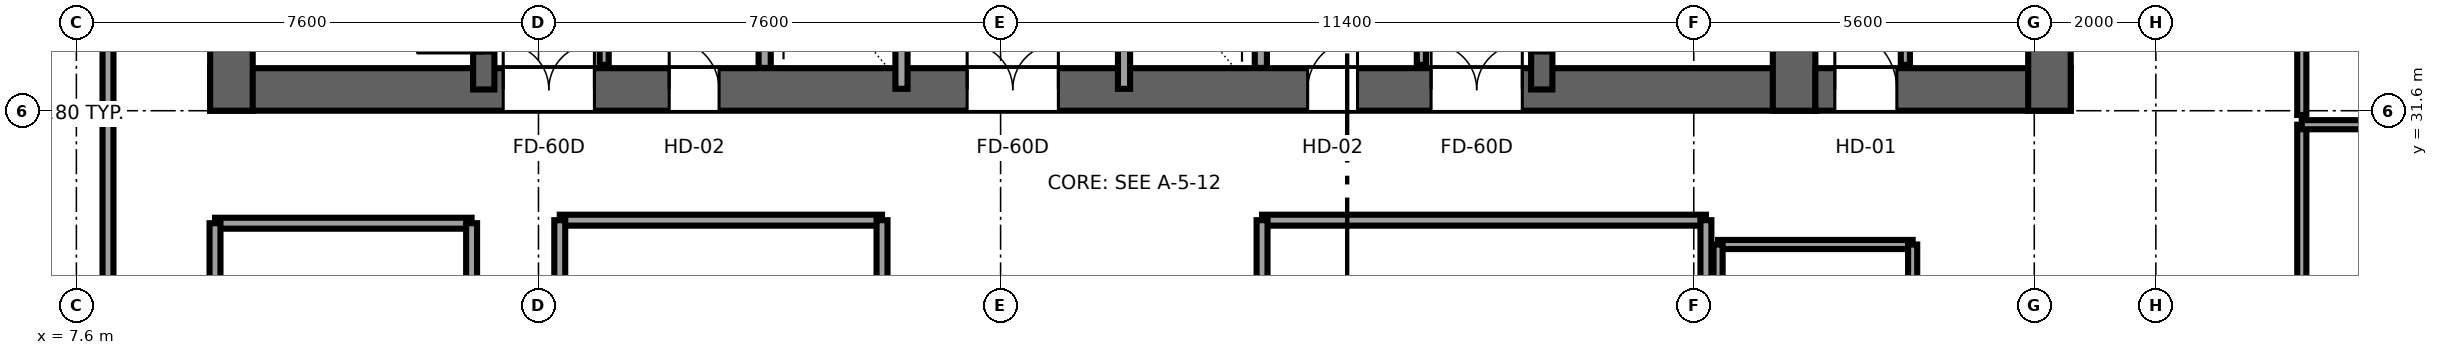
"""IFC4 building model, lengths in metres.
Left out: names, types, materials, properties, quantities, classifications, styles, units other than length and angle.
Written with IfcOpenShell. Run it as: python <this file> out.ifc"""

import sys

from ifc_helpers import new_model, si_unit, direction, frame, frame_2d, origin, place, context, subcontext, project, spatial, rectangle, extrude, source, transform, mapped, element, fill, save


model = new_model("IFC4")
c1 = context("Model", 3, precision=1e-05, world=origin(), true_north=direction((0.0, 1.0)))
c2 = subcontext(c1, "Body", "Model", "MODEL_VIEW")
j1 = project(units=[si_unit("LENGTHUNIT", "METRE"), si_unit("PLANEANGLEUNIT", "RADIAN")], contexts=[c1])
p1 = place(None, origin())
s1 = spatial("IfcSite", under=j1, at=p1, CompositionType="ELEMENT")
p2 = place(p1, origin())
s2 = spatial("IfcBuilding", under=s1, at=p2, CompositionType="ELEMENT")
p3 = place(p2, frame((0.0, 0.0, 136.4)))
s3 = spatial("IfcBuildingStorey", under=s2, at=p3, CompositionType="ELEMENT", Elevation=136.4)
p4 = place(p3, frame((9.8, 31.95, 0.0), z_axis=(0.0, 0.0, 1.0), x_axis=(1.0, 0.0, 0.0)))
e1 = element("IfcWall", 1, at=p4, inside=s3, PredefinedType="SHEAR", context=c2, shape_type="SweptSolid", body=[
    extrude(rectangle(XDim=26.4, YDim=0.7, at=frame_2d((13.2, 0.0))), origin(), (0.0, 0.0, 1.0), 3.55),
])
p5 = place(p4, frame((6.32, 0.0, 0.0), z_axis=(0.0, 0.0, 1.0), x_axis=(-1.0, 0.0, 0.0)))
e2 = element("IfcOpeningElement", 2, at=p5, cuts=e1, PredefinedType="OPENING", context=c2, shape_type="SweptSolid", body=[
    extrude(rectangle(XDim=1.5, YDim=2.04, at=frame_2d((0.75, 1.02))), frame((0.0, 0.36, 0.0), z_axis=(0.0, -1.0, 0.0), x_axis=(1.0, 0.0, 0.0)), (0.0, 0.0, 1.0), 0.72),
])
p6 = place(p4, frame((13.95, 0.0, 0.0), z_axis=(0.0, 0.0, 1.0), x_axis=(-1.0, 0.0, 0.0)))
e3 = element("IfcOpeningElement", 3, at=p6, cuts=e1, PredefinedType="OPENING", context=c2, shape_type="SweptSolid", body=[
    extrude(rectangle(XDim=1.5, YDim=2.04, at=frame_2d((0.75, 1.02))), frame((0.0, 0.36, 0.0), z_axis=(0.0, -1.0, 0.0), x_axis=(1.0, 0.0, 0.0)), (0.0, 0.0, 1.0), 0.72),
])
p7 = place(p4, frame((21.58, 0.0, 0.0), z_axis=(0.0, 0.0, 1.0), x_axis=(-1.0, 0.0, 0.0)))
e4 = element("IfcOpeningElement", 4, at=p7, cuts=e1, PredefinedType="OPENING", context=c2, shape_type="SweptSolid", body=[
    extrude(rectangle(XDim=1.5, YDim=2.04, at=frame_2d((0.75, 1.02))), frame((0.0, 0.36, 0.0), z_axis=(0.0, -1.0, 0.0), x_axis=(1.0, 0.0, 0.0)), (0.0, 0.0, 1.0), 0.72),
])
p8 = place(p4, frame((8.37, 0.0, 0.0), z_axis=(0.0, 0.0, 1.0), x_axis=(-1.0, 0.0, 0.0)))
e5 = element("IfcOpeningElement", 5, at=p8, cuts=e1, PredefinedType="OPENING", context=c2, shape_type="SweptSolid", body=[
    extrude(rectangle(XDim=0.82, YDim=2.01, at=frame_2d((0.41, 1.005))), frame((0.0, 0.36, 0.0), z_axis=(0.0, -1.0, 0.0), x_axis=(1.0, 0.0, 0.0)), (0.0, 0.0, 1.0), 0.72),
])
p9 = place(p4, frame((18.87, 0.0, 0.0), z_axis=(0.0, 0.0, 1.0), x_axis=(-1.0, 0.0, 0.0)))
e6 = element("IfcOpeningElement", 6, at=p9, cuts=e1, PredefinedType="OPENING", context=c2, shape_type="SweptSolid", body=[
    extrude(rectangle(XDim=0.82, YDim=2.01, at=frame_2d((0.41, 1.005))), frame((0.0, 0.36, 0.0), z_axis=(0.0, -1.0, 0.0), x_axis=(1.0, 0.0, 0.0)), (0.0, 0.0, 1.0), 0.72),
])
for number, where, z_axis, x_axis in (
    (7, (10.15, 31.6, 0.0), (0.0, 0.0, 1.0), (0.0, 1.0, 0.0)),
    (8, (35.85, 31.6, 0.0), (0.0, 0.0, 1.0), (0.0, 1.0, 0.0)),
):
    element("IfcWall", number, at=place(p3, frame(where, z_axis=z_axis, x_axis=x_axis)), inside=s3, PredefinedType="SHEAR", context=c2, shape_type="SweptSolid", body=[
        extrude(rectangle(XDim=13.6, YDim=0.7, at=frame_2d((6.8, 0.0))), origin(), (0.0, 0.0, 1.0), 3.55),
    ])
p10 = place(p3, frame((14.3, 31.95, 0.0), z_axis=(0.0, 0.0, 1.0), x_axis=(0.0, 1.0, 0.0)))
e9 = element("IfcWall", 9, at=p10, inside=s3, PredefinedType="SHEAR", context=c2, shape_type="SweptSolid", body=[
    extrude(rectangle(XDim=12.9, YDim=0.35, at=frame_2d((6.45, 0.0))), origin(), (0.0, 0.0, 1.0), 3.55),
])
p11 = place(p10, frame((0.6, 0.0, 0.0)))
e10 = element("IfcOpeningElement", 10, at=p11, cuts=e9, PredefinedType="OPENING", context=c2, shape_type="SweptSolid", body=[
    extrude(rectangle(XDim=1.1, YDim=2.12, at=frame_2d((0.55, 1.06))), frame((0.0, 0.185, 0.0), z_axis=(0.0, -1.0, 0.0), x_axis=(1.0, 0.0, 0.0)), (0.0, 0.0, 1.0), 0.37),
])
p12 = place(p3, frame((31.7, 31.95, 0.0), z_axis=(0.0, 0.0, 1.0), x_axis=(0.0, 1.0, 0.0)))
e11 = element("IfcWall", 11, at=p12, inside=s3, PredefinedType="SHEAR", context=c2, shape_type="SweptSolid", body=[
    extrude(rectangle(XDim=12.9, YDim=0.35, at=frame_2d((6.45, 0.0))), origin(), (0.0, 0.0, 1.0), 3.55),
])
p13 = place(p12, frame((1.7, 0.0, 0.0), z_axis=(0.0, 0.0, 1.0), x_axis=(-1.0, 0.0, 0.0)))
e12 = element("IfcOpeningElement", 12, at=p13, cuts=e11, PredefinedType="OPENING", context=c2, shape_type="SweptSolid", body=[
    extrude(rectangle(XDim=1.1, YDim=2.12, at=frame_2d((0.55, 1.06))), frame((0.0, 0.185, 0.0), z_axis=(0.0, -1.0, 0.0), x_axis=(1.0, 0.0, 0.0)), (0.0, 0.0, 1.0), 0.37),
])
p14 = place(p3, frame((36.2, 31.95, 0.0), z_axis=(0.0, 0.0, 1.0), x_axis=(1.0, 0.0, 0.0)))
e13 = element("IfcWall", 13, at=p14, inside=s3, PredefinedType="SHEAR", context=c2, shape_type="SweptSolid", body=[
    extrude(rectangle(XDim=4.2, YDim=0.7, at=frame_2d((2.1, 0.0))), origin(), (0.0, 0.0, 1.0), 3.55),
])
p15 = place(p14, frame((1.34, 0.0, 0.0), z_axis=(0.0, 0.0, 1.0), x_axis=(-1.0, 0.0, 0.0)))
e14 = element("IfcOpeningElement", 14, at=p15, cuts=e13, PredefinedType="OPENING", context=c2, shape_type="SweptSolid", body=[
    extrude(rectangle(XDim=1.02, YDim=2.03, at=frame_2d((0.51, 1.015))), frame((0.0, 0.36, 0.0), z_axis=(0.0, -1.0, 0.0), x_axis=(1.0, 0.0, 0.0)), (0.0, 0.0, 1.0), 0.72),
])
p16 = place(p3, frame((40.05, 31.6, 0.0), z_axis=(0.0, 0.0, 1.0), x_axis=(0.0, 1.0, 0.0)))
e15 = element("IfcWall", 15, at=p16, inside=s3, PredefinedType="SHEAR", context=c2, shape_type="SweptSolid", body=[
    extrude(rectangle(XDim=13.6, YDim=0.7, at=frame_2d((6.8, 0.0))), origin(), (0.0, 0.0, 1.0), 3.55),
])
for number, where, z_axis, x_axis in (
    (16, (18.92, 32.304, 0.0), (0.0, 0.0, 1.0), (0.0, 1.0, 0.0)),
    (17, (27.08, 32.304, 0.0), (0.0, 0.0, 1.0), (0.0, 1.0, 0.0)),
):
    element("IfcWall", number, at=place(p3, frame(where, z_axis=z_axis, x_axis=x_axis)), inside=s3, PredefinedType="SOLIDWALL", context=c2, shape_type="SweptSolid", body=[
        extrude(rectangle(XDim=3.846, YDim=0.2, at=frame_2d((1.923, 0.0))), origin(), (0.0, 0.0, 1.0), 3.37),
    ])
p17 = place(p3, frame((21.17, 31.96, 0.0), z_axis=(0.0, 0.0, 1.0), x_axis=(0.0, 1.0, 0.0)))
e18 = element("IfcWall", 18, at=p17, inside=s3, PredefinedType="SOLIDWALL", context=c2, shape_type="SweptSolid", body=[
    extrude(rectangle(XDim=12.58, YDim=0.2, at=frame_2d((6.29, 0.0))), origin(), (0.0, 0.0, 1.0), 3.37),
])
p18 = place(p17, frame((5.74, 0.0, 0.0)))
e19 = element("IfcOpeningElement", 19, at=p18, cuts=e18, PredefinedType="OPENING", context=c2, shape_type="SweptSolid", body=[
    extrude(rectangle(XDim=1.1, YDim=2.12, at=frame_2d((0.55, 1.06))), frame((0.0, 0.11, 0.0), z_axis=(0.0, -1.0, 0.0), x_axis=(1.0, 0.0, 0.0)), (0.0, 0.0, 1.0), 0.22),
])
p19 = place(p17, frame((8.24, 0.0, 0.0)))
e20 = element("IfcOpeningElement", 20, at=p19, cuts=e18, PredefinedType="OPENING", context=c2, shape_type="SweptSolid", body=[
    extrude(rectangle(XDim=1.1, YDim=2.12, at=frame_2d((0.55, 1.06))), frame((0.0, 0.11, 0.0), z_axis=(0.0, -1.0, 0.0), x_axis=(1.0, 0.0, 0.0)), (0.0, 0.0, 1.0), 0.22),
])
p20 = place(p3, frame((24.83, 31.96, 0.0), z_axis=(0.0, 0.0, 1.0), x_axis=(0.0, 1.0, 0.0)))
e21 = element("IfcWall", 21, at=p20, inside=s3, PredefinedType="SOLIDWALL", context=c2, shape_type="SweptSolid", body=[
    extrude(rectangle(XDim=12.58, YDim=0.2, at=frame_2d((6.29, 0.0))), origin(), (0.0, 0.0, 1.0), 3.37),
])
p21 = place(p20, frame((5.74, 0.0, 0.0)))
e22 = element("IfcOpeningElement", 22, at=p21, cuts=e21, PredefinedType="OPENING", context=c2, shape_type="SweptSolid", body=[
    extrude(rectangle(XDim=1.1, YDim=2.12, at=frame_2d((0.55, 1.06))), frame((0.0, 0.11, 0.0), z_axis=(0.0, -1.0, 0.0), x_axis=(1.0, 0.0, 0.0)), (0.0, 0.0, 1.0), 0.22),
])
p22 = place(p20, frame((8.24, 0.0, 0.0)))
e23 = element("IfcOpeningElement", 23, at=p22, cuts=e21, PredefinedType="OPENING", context=c2, shape_type="SweptSolid", body=[
    extrude(rectangle(XDim=1.1, YDim=2.12, at=frame_2d((0.55, 1.06))), frame((0.0, 0.11, 0.0), z_axis=(0.0, -1.0, 0.0), x_axis=(1.0, 0.0, 0.0)), (0.0, 0.0, 1.0), 0.22),
])
for number, where, z_axis, x_axis in (
    (24, (16.28, 32.355, 0.0), (0.0, 0.0, 1.0), (0.0, 1.0, 0.0)),
    (25, (29.72, 32.355, 0.0), (0.0, 0.0, 1.0), (0.0, 1.0, 0.0)),
):
    element("IfcWall", number, at=place(p3, frame(where, z_axis=z_axis, x_axis=x_axis)), inside=s3, PredefinedType="PARTITIONING", context=c2, shape_type="SweptSolid", body=[
        extrude(rectangle(XDim=0.865, YDim=0.15, at=frame_2d((0.433, 0.0))), origin(), (0.0, 0.0, 1.0), 3.37),
    ])
p23 = place(p3, frame((37.68, 32.355, 0.0), z_axis=(0.0, 0.0, 1.0), x_axis=(0.0, 1.0, 0.0)))
e26 = element("IfcWall", 26, at=p23, inside=s3, PredefinedType="PARTITIONING", context=c2, shape_type="SweptSolid", body=[
    extrude(rectangle(XDim=7.845, YDim=0.15, at=frame_2d((3.922, 0.0))), origin(), (0.0, 0.0, 1.0), 3.37),
])
p24 = place(p23, frame((3.413, 0.0, 0.0)))
e27 = element("IfcOpeningElement", 27, at=p24, cuts=e26, PredefinedType="OPENING", context=c2, shape_type="SweptSolid", body=[
    extrude(rectangle(XDim=1.02, YDim=2.03, at=frame_2d((0.51, 1.015))), frame((0.0, 0.085, 0.0), z_axis=(0.0, -1.0, 0.0), x_axis=(1.0, 0.0, 0.0)), (0.0, 0.0, 1.0), 0.17),
])
p25 = place(p3, frame((8.12, 22.3, 0.0), z_axis=(0.0, 0.0, 1.0), x_axis=(0.0, 1.0, 0.0)))
e28 = element("IfcWall", 28, at=p25, inside=s3, PredefinedType="PARTITIONING", context=c2, shape_type="SweptSolid", body=[
    extrude(rectangle(XDim=13.5, YDim=0.18, at=frame_2d((6.75, 0.0))), origin(), (0.0, 0.0, 1.0), 3.37),
])
p26 = place(p25, frame((3.35, 0.0, 0.0)))
e29 = element("IfcOpeningElement", 29, at=p26, cuts=e28, PredefinedType="OPENING", context=c2, shape_type="SweptSolid", body=[
    extrude(rectangle(XDim=1.65, YDim=2.15, at=frame_2d((0.825, 1.075))), frame((0.0, 0.1, 0.0), z_axis=(0.0, -1.0, 0.0), x_axis=(1.0, 0.0, 0.0)), (0.0, 0.0, 1.0), 0.2),
])
p27 = place(p3, frame((44.2, 22.38, 0.0), z_axis=(0.0, 0.0, 1.0), x_axis=(0.0, 1.0, 0.0)))
e30 = element("IfcWall", 30, at=p27, inside=s3, PredefinedType="PARTITIONING", context=c2, shape_type="SweptSolid", body=[
    extrude(rectangle(XDim=8.99, YDim=0.15, at=frame_2d((4.495, 0.0))), origin(), (0.0, 0.0, 1.0), 3.37),
])
p28 = place(p27, frame((4.005, 0.0, 0.0)))
e31 = element("IfcOpeningElement", 31, at=p28, cuts=e30, PredefinedType="OPENING", context=c2, shape_type="SweptSolid", body=[
    extrude(rectangle(XDim=0.98, YDim=2.12, at=frame_2d((0.49, 1.06))), frame((0.0, 0.085, 0.0), z_axis=(0.0, -1.0, 0.0), x_axis=(1.0, 0.0, 0.0)), (0.0, 0.0, 1.0), 0.17),
])
p29 = place(p3, frame((44.2, 31.37, 0.0), z_axis=(0.0, 0.0, 1.0), x_axis=(1.0, 0.0, 0.0)))
e32 = element("IfcWall", 32, at=p29, inside=s3, PredefinedType="PARTITIONING", context=c2, shape_type="SweptSolid", body=[
    extrude(rectangle(XDim=10.03, YDim=0.15, at=frame_2d((5.015, 0.0))), origin(), (0.0, 0.0, 1.0), 3.37),
])
p30 = place(p3, frame((44.2, 31.53, 0.0), z_axis=(0.0, 0.0, 1.0), x_axis=(0.0, 1.0, 0.0)))
e33 = element("IfcWall", 33, at=p30, inside=s3, PredefinedType="PARTITIONING", context=c2, shape_type="SweptSolid", body=[
    extrude(rectangle(XDim=8.99, YDim=0.15, at=frame_2d((4.495, 0.0))), origin(), (0.0, 0.0, 1.0), 3.37),
])
p31 = place(p30, frame((4.005, 0.0, 0.0)))
e34 = element("IfcOpeningElement", 34, at=p31, cuts=e33, PredefinedType="OPENING", context=c2, shape_type="SweptSolid", body=[
    extrude(rectangle(XDim=0.98, YDim=2.12, at=frame_2d((0.49, 1.06))), frame((0.0, 0.085, 0.0), z_axis=(0.0, -1.0, 0.0), x_axis=(1.0, 0.0, 0.0)), (0.0, 0.0, 1.0), 0.17),
])
p32 = place(p3, frame((9.88, 29.75, 0.0), z_axis=(0.0, 0.0, 1.0), x_axis=(1.0, 0.0, 0.0)))
e35 = element("IfcWall", 35, at=p32, inside=s3, PredefinedType="PARTITIONING", context=c2, shape_type="SweptSolid", body=[
    extrude(rectangle(XDim=4.22, YDim=0.18, at=frame_2d((2.11, 0.0))), origin(), (0.0, 0.0, 1.0), 3.37),
])
for number, where, z_axis, x_axis in (
    (36, (9.88, 22.3, 0.0), (0.0, 0.0, 1.0), (0.0, 1.0, 0.0)),
    (37, (14.1, 22.3, 0.0), (0.0, 0.0, 1.0), (0.0, 1.0, 0.0)),
):
    element("IfcWall", number, at=place(p3, frame(where, z_axis=z_axis, x_axis=x_axis)), inside=s3, PredefinedType="PARTITIONING", context=c2, shape_type="SweptSolid", body=[
        extrude(rectangle(XDim=7.45, YDim=0.18, at=frame_2d((3.725, 0.0))), origin(), (0.0, 0.0, 1.0), 3.37),
    ])
p33 = place(p3, frame((27.1, 29.8, 0.0), z_axis=(0.0, 0.0, 1.0), x_axis=(1.0, 0.0, 0.0)))
e38 = element("IfcWall", 38, at=p33, inside=s3, PredefinedType="PARTITIONING", context=c2, shape_type="SweptSolid", body=[
    extrude(rectangle(XDim=7.3, YDim=0.18, at=frame_2d((3.65, 0.0))), origin(), (0.0, 0.0, 1.0), 3.37),
])
for number, where, z_axis, x_axis in (
    (39, (27.1, 22.3, 0.0), (0.0, 0.0, 1.0), (0.0, 1.0, 0.0)),
    (40, (34.4, 22.3, 0.0), (0.0, 0.0, 1.0), (0.0, 1.0, 0.0)),
):
    element("IfcWall", number, at=place(p3, frame(where, z_axis=z_axis, x_axis=x_axis)), inside=s3, PredefinedType="PARTITIONING", context=c2, shape_type="SweptSolid", body=[
        extrude(rectangle(XDim=7.5, YDim=0.18, at=frame_2d((3.75, 0.0))), origin(), (0.0, 0.0, 1.0), 3.37),
    ])
p34 = place(p3, frame((15.55, 29.8, 0.0), z_axis=(0.0, 0.0, 1.0), x_axis=(1.0, 0.0, 0.0)))
e41 = element("IfcWall", 41, at=p34, inside=s3, PredefinedType="PARTITIONING", context=c2, shape_type="SweptSolid", body=[
    extrude(rectangle(XDim=5.3, YDim=0.18, at=frame_2d((2.65, 0.0))), origin(), (0.0, 0.0, 1.0), 3.37),
])
for number, where, z_axis, x_axis in (
    (42, (15.55, 22.3, 0.0), (0.0, 0.0, 1.0), (0.0, 1.0, 0.0)),
    (43, (20.85, 22.3, 0.0), (0.0, 0.0, 1.0), (0.0, 1.0, 0.0)),
):
    element("IfcWall", number, at=place(p3, frame(where, z_axis=z_axis, x_axis=x_axis)), inside=s3, PredefinedType="PARTITIONING", context=c2, shape_type="SweptSolid", body=[
        extrude(rectangle(XDim=7.5, YDim=0.18, at=frame_2d((3.75, 0.0))), origin(), (0.0, 0.0, 1.0), 3.37),
    ])
p35 = place(p3, frame((34.6, 29.4, 0.0), z_axis=(0.0, 0.0, 1.0), x_axis=(1.0, 0.0, 0.0)))
e44 = element("IfcWall", 44, at=p35, inside=s3, PredefinedType="PARTITIONING", context=c2, shape_type="SweptSolid", body=[
    extrude(rectangle(XDim=3.2, YDim=0.15, at=frame_2d((1.6, 0.0))), origin(), (0.0, 0.0, 1.0), 3.37),
])
for number, where, z_axis, x_axis in (
    (45, (34.6, 22.3, 0.0), (0.0, 0.0, 1.0), (0.0, 1.0, 0.0)),
    (46, (37.8, 22.3, 0.0), (0.0, 0.0, 1.0), (0.0, 1.0, 0.0)),
):
    element("IfcWall", number, at=place(p3, frame(where, z_axis=z_axis, x_axis=x_axis)), inside=s3, PredefinedType="PARTITIONING", context=c2, shape_type="SweptSolid", body=[
        extrude(rectangle(XDim=7.1, YDim=0.15, at=frame_2d((3.55, 0.0))), origin(), (0.0, 0.0, 1.0), 3.37),
    ])
m1 = source(origin(), c2, "Body", "SweptSolid", [
    extrude(rectangle(XDim=1.1, YDim=2.12, at=frame_2d((0.55, 1.06))), frame((0.0, 0.025, 0.0), z_axis=(0.0, -1.0, 0.0), x_axis=(1.0, 0.0, 0.0)), (0.0, 0.0, 1.0), 0.05),
])
p36 = place(p11, origin())
e47 = element("IfcDoor", 47, at=p36, inside=s3, OperationType="SINGLE_SWING_LEFT", PredefinedType="DOOR", context=c2, shape_type="MappedRepresentation", body=[
    mapped(m1, transform((0.0, 0.0, 0.0), x_axis=(1.0, 0.0, 0.0), y_axis=(0.0, 1.0, 0.0), z_axis=(0.0, 0.0, 1.0), scale=1.0)),
])
fill(e10, e47)
p37 = place(p13, origin())
e48 = element("IfcDoor", 48, at=p37, inside=s3, OperationType="SINGLE_SWING_RIGHT", PredefinedType="DOOR", context=c2, shape_type="MappedRepresentation", body=[
    mapped(m1, transform((0.0, 0.0, 0.0), x_axis=(1.0, 0.0, 0.0), y_axis=(0.0, 1.0, 0.0), z_axis=(0.0, 0.0, 1.0), scale=1.0)),
])
fill(e12, e48)
m2 = source(origin(), c2, "Body", "SweptSolid", [
    extrude(rectangle(XDim=1.5, YDim=2.04, at=frame_2d((0.75, 1.02))), frame((0.0, 0.025, 0.0), z_axis=(0.0, -1.0, 0.0), x_axis=(1.0, 0.0, 0.0)), (0.0, 0.0, 1.0), 0.05),
])
p38 = place(p5, origin())
e49 = element("IfcDoor", 49, at=p38, inside=s3, OperationType="DOUBLE_DOOR_SINGLE_SWING", PredefinedType="DOOR", context=c2, shape_type="MappedRepresentation", body=[
    mapped(m2, transform((0.0, 0.0, 0.0), x_axis=(1.0, 0.0, 0.0), y_axis=(0.0, 1.0, 0.0), z_axis=(0.0, 0.0, 1.0), scale=1.0)),
])
fill(e2, e49)
p39 = place(p6, origin())
e50 = element("IfcDoor", 50, at=p39, inside=s3, OperationType="DOUBLE_DOOR_SINGLE_SWING", PredefinedType="DOOR", context=c2, shape_type="MappedRepresentation", body=[
    mapped(m2, transform((0.0, 0.0, 0.0), x_axis=(1.0, 0.0, 0.0), y_axis=(0.0, 1.0, 0.0), z_axis=(0.0, 0.0, 1.0), scale=1.0)),
])
fill(e3, e50)
p40 = place(p7, origin())
e51 = element("IfcDoor", 51, at=p40, inside=s3, OperationType="DOUBLE_DOOR_SINGLE_SWING", PredefinedType="DOOR", context=c2, shape_type="MappedRepresentation", body=[
    mapped(m2, transform((0.0, 0.0, 0.0), x_axis=(1.0, 0.0, 0.0), y_axis=(0.0, 1.0, 0.0), z_axis=(0.0, 0.0, 1.0), scale=1.0)),
])
fill(e4, e51)
m3 = source(origin(), c2, "Body", "SweptSolid", [
    extrude(rectangle(XDim=0.82, YDim=2.01, at=frame_2d((0.41, 1.005))), frame((0.0, 0.025, 0.0), z_axis=(0.0, -1.0, 0.0), x_axis=(1.0, 0.0, 0.0)), (0.0, 0.0, 1.0), 0.05),
])
p41 = place(p8, origin())
e52 = element("IfcDoor", 52, at=p41, inside=s3, OperationType="SINGLE_SWING_LEFT", PredefinedType="DOOR", context=c2, shape_type="MappedRepresentation", body=[
    mapped(m3, transform((0.0, 0.0, 0.0), x_axis=(1.0, 0.0, 0.0), y_axis=(0.0, 1.0, 0.0), z_axis=(0.0, 0.0, 1.0), scale=1.0)),
])
fill(e5, e52)
p42 = place(p9, origin())
e53 = element("IfcDoor", 53, at=p42, inside=s3, OperationType="SINGLE_SWING_RIGHT", PredefinedType="DOOR", context=c2, shape_type="MappedRepresentation", body=[
    mapped(m3, transform((0.0, 0.0, 0.0), x_axis=(1.0, 0.0, 0.0), y_axis=(0.0, 1.0, 0.0), z_axis=(0.0, 0.0, 1.0), scale=1.0)),
])
fill(e6, e53)
m4 = source(origin(), c2, "Body", "SweptSolid", [
    extrude(rectangle(XDim=1.02, YDim=2.03, at=frame_2d((0.51, 1.015))), frame((0.0, 0.025, 0.0), z_axis=(0.0, -1.0, 0.0), x_axis=(1.0, 0.0, 0.0)), (0.0, 0.0, 1.0), 0.05),
])
p43 = place(p15, origin())
e54 = element("IfcDoor", 54, at=p43, inside=s3, OperationType="SINGLE_SWING_LEFT", PredefinedType="DOOR", context=c2, shape_type="MappedRepresentation", body=[
    mapped(m4, transform((0.0, 0.0, 0.0), x_axis=(1.0, 0.0, 0.0), y_axis=(0.0, 1.0, 0.0), z_axis=(0.0, 0.0, 1.0), scale=1.0)),
])
fill(e14, e54)
save(model, sys.argv[1])
